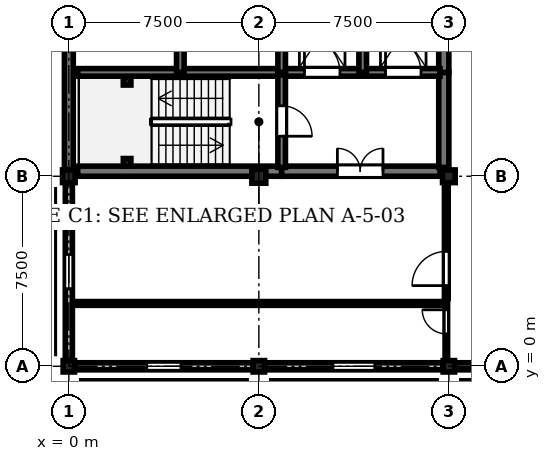
"""IFC4 building model, lengths in metres.
Left out: names, types, materials, properties, quantities, classifications, styles, units other than length and angle.
Written with IfcOpenShell. Run it as: python <this file> out.ifc"""

import sys

from ifc_helpers import new_model, si_unit, direction, frame, frame_2d, origin, origin_with_axes, origin_2d, place, context, subcontext, project, spatial, rectangle, i_section, extrude, element, fill, save


model = new_model("IFC4")
c1 = context("Model", 3, precision=1e-05, world=origin(), true_north=direction((0.0, 1.0)))
c2 = subcontext(c1, "Body", "Model", "MODEL_VIEW")
j1 = project(units=[si_unit("LENGTHUNIT", "METRE"), si_unit("PLANEANGLEUNIT", "RADIAN")], contexts=[c1])
p1 = place(None, origin())
s1 = spatial("IfcSite", under=j1, at=p1, CompositionType="ELEMENT")
p2 = place(p1, origin())
s2 = spatial("IfcBuilding", under=s1, at=p2, CompositionType="ELEMENT")
p3 = place(p2, frame((0.0, 0.0, 25.95)))
s3 = spatial("IfcBuildingStorey", under=s2, at=p3, CompositionType="ELEMENT", Elevation=25.95)
p4 = place(p3, origin_with_axes())
e1 = element("IfcColumn", 1, at=p4, inside=s3, PredefinedType="COLUMN", context=c2, shape_type="SweptSolid", body=[
    extrude(rectangle(XDim=0.45, YDim=0.45, at=origin_2d()), origin(), (0.0, 0.0, 1.0), 4.05),
])
p5 = place(p3, frame((0.0, 7.5, 0.0), z_axis=(0.0, 0.0, 1.0), x_axis=(1.0, 0.0, 0.0)))
e2 = element("IfcColumn", 2, at=p5, inside=s3, PredefinedType="COLUMN", context=c2, shape_type="SweptSolid", body=[
    extrude(rectangle(XDim=0.5, YDim=0.5, at=origin_2d()), origin(), (0.0, 0.0, 1.0), 4.05),
])
p6 = place(p3, frame((7.5, 0.0, 0.0), z_axis=(0.0, 0.0, 1.0), x_axis=(1.0, 0.0, 0.0)))
e3 = element("IfcColumn", 3, at=p6, inside=s3, PredefinedType="COLUMN", context=c2, shape_type="SweptSolid", body=[
    extrude(rectangle(XDim=0.45, YDim=0.45, at=origin_2d()), origin(), (0.0, 0.0, 1.0), 4.05),
])
p7 = place(p3, frame((7.5, 7.5, 0.0), z_axis=(0.0, 0.0, 1.0), x_axis=(1.0, 0.0, 0.0)))
e4 = element("IfcColumn", 4, at=p7, inside=s3, PredefinedType="COLUMN", context=c2, shape_type="SweptSolid", body=[
    extrude(rectangle(XDim=0.55, YDim=0.55, at=origin_2d()), origin(), (0.0, 0.0, 1.0), 4.05),
])
p8 = place(p3, frame((15.0, 0.0, 0.0), z_axis=(0.0, 0.0, 1.0), x_axis=(1.0, 0.0, 0.0)))
e5 = element("IfcColumn", 5, at=p8, inside=s3, PredefinedType="COLUMN", context=c2, shape_type="SweptSolid", body=[
    extrude(rectangle(XDim=0.45, YDim=0.45, at=origin_2d()), origin(), (0.0, 0.0, 1.0), 4.05),
])
p9 = place(p3, frame((15.0, 7.5, 0.0), z_axis=(0.0, 0.0, 1.0), x_axis=(1.0, 0.0, 0.0)))
e6 = element("IfcColumn", 6, at=p9, inside=s3, PredefinedType="COLUMN", context=c2, shape_type="SweptSolid", body=[
    extrude(rectangle(XDim=0.5, YDim=0.5, at=origin_2d()), origin(), (0.0, 0.0, 1.0), 4.05),
])
for number, where, z_axis, x_axis in (
    (7, (2.3, 8.05, 0.0), (0.0, 0.0, 1.0), (1.0, 0.0, 0.0)),
    (8, (2.3, 11.25, 0.0), (0.0, 0.0, 1.0), (1.0, 0.0, 0.0)),
):
    element("IfcColumn", number, at=place(p3, frame(where, z_axis=z_axis, x_axis=x_axis)), inside=s3, PredefinedType="COLUMN", context=c2, shape_type="SweptSolid", body=[
        extrude(i_section(OverallWidth=0.3, OverallDepth=0.3, WebThickness=0.011, FlangeThickness=0.019, FilletRadius=0.027, at=origin_2d()), origin(), (0.0, 0.0, 1.0), 4.05),
    ])
p10 = place(p3, frame((7.265, 0.0, 0.0), z_axis=(0.0, 0.0, 1.0), x_axis=(-1.0, 0.0, 0.0)))
e9 = element("IfcWall", 9, at=p10, inside=s3, PredefinedType="STANDARD", context=c2, shape_type="SweptSolid", body=[
    extrude(rectangle(XDim=7.03, YDim=0.28, at=frame_2d((3.515, 0.0))), origin(), (0.0, 0.0, 1.0), 3.17),
])
p11 = place(p10, frame((2.84, 0.0, 0.85)))
e10 = element("IfcOpeningElement", 10, at=p11, cuts=e9, PredefinedType="OPENING", context=c2, shape_type="SweptSolid", body=[
    extrude(rectangle(XDim=1.35, YDim=2.04, at=frame_2d((0.675, 1.02))), frame((0.0, 0.15, 0.0), z_axis=(0.0, -1.0, 0.0), x_axis=(1.0, 0.0, 0.0)), (0.0, 0.0, 1.0), 0.3),
])
p12 = place(p3, frame((0.0, 0.235, 0.0), z_axis=(0.0, 0.0, 1.0), x_axis=(0.0, 1.0, 0.0)))
e11 = element("IfcWall", 11, at=p12, inside=s3, PredefinedType="STANDARD", context=c2, shape_type="SweptSolid", body=[
    extrude(rectangle(XDim=7.005, YDim=0.28, at=frame_2d((3.502, 0.0))), origin(), (0.0, 0.0, 1.0), 3.17),
])
p13 = place(p12, frame((2.827, 0.0, 0.85)))
e12 = element("IfcOpeningElement", 12, at=p13, cuts=e11, PredefinedType="OPENING", context=c2, shape_type="SweptSolid", body=[
    extrude(rectangle(XDim=1.35, YDim=2.04, at=frame_2d((0.675, 1.02))), frame((0.0, 0.15, 0.0), z_axis=(0.0, -1.0, 0.0), x_axis=(1.0, 0.0, 0.0)), (0.0, 0.0, 1.0), 0.3),
])
p14 = place(p3, frame((0.0, 7.76, 0.0), z_axis=(0.0, 0.0, 1.0), x_axis=(0.0, 1.0, 0.0)))
e13 = element("IfcWall", 13, at=p14, inside=s3, PredefinedType="SHEAR", context=c2, shape_type="SweptSolid", body=[
    extrude(rectangle(XDim=6.955, YDim=0.35, at=frame_2d((3.478, 0.0))), origin(), (0.0, 0.0, 1.0), 3.77),
])
p15 = place(p3, frame((14.765, 0.0, 0.0), z_axis=(0.0, 0.0, 1.0), x_axis=(-1.0, 0.0, 0.0)))
e14 = element("IfcWall", 14, at=p15, inside=s3, PredefinedType="STANDARD", context=c2, shape_type="SweptSolid", body=[
    extrude(rectangle(XDim=7.03, YDim=0.28, at=frame_2d((3.515, 0.0))), origin(), (0.0, 0.0, 1.0), 3.17),
])
p16 = place(p15, frame((2.69, 0.0, 0.85)))
e15 = element("IfcOpeningElement", 15, at=p16, cuts=e14, PredefinedType="OPENING", context=c2, shape_type="SweptSolid", body=[
    extrude(rectangle(XDim=1.65, YDim=2.04, at=frame_2d((0.825, 1.02))), frame((0.0, 0.15, 0.0), z_axis=(0.0, -1.0, 0.0), x_axis=(1.0, 0.0, 0.0)), (0.0, 0.0, 1.0), 0.3),
])
p17 = place(p3, frame((22.265, 0.0, 0.0), z_axis=(0.0, 0.0, 1.0), x_axis=(-1.0, 0.0, 0.0)))
e16 = element("IfcWall", 16, at=p17, inside=s3, PredefinedType="STANDARD", context=c2, shape_type="SweptSolid", body=[
    extrude(rectangle(XDim=7.03, YDim=0.28, at=frame_2d((3.515, 0.0))), origin(), (0.0, 0.0, 1.0), 3.17),
])
p18 = place(p17, frame((2.84, 0.0, 0.85)))
e17 = element("IfcOpeningElement", 17, at=p18, cuts=e16, PredefinedType="OPENING", context=c2, shape_type="SweptSolid", body=[
    extrude(rectangle(XDim=1.35, YDim=2.04, at=frame_2d((0.675, 1.02))), frame((0.0, 0.15, 0.0), z_axis=(0.0, -1.0, 0.0), x_axis=(1.0, 0.0, 0.0)), (0.0, 0.0, 1.0), 0.3),
])
p19 = place(p3, frame((0.35, 7.7, 0.0), z_axis=(0.0, 0.0, 1.0), x_axis=(1.0, 0.0, 0.0)))
e18 = element("IfcWall", 18, at=p19, inside=s3, PredefinedType="SHEAR", context=c2, shape_type="SweptSolid", body=[
    extrude(rectangle(XDim=8.05, YDim=0.4, at=frame_2d((4.025, 0.0))), origin(), (0.0, 0.0, 1.0), 3.77),
])
p20 = place(p3, frame((8.4, 7.7, 0.0), z_axis=(0.0, 0.0, 1.0), x_axis=(1.0, 0.0, 0.0)))
e19 = element("IfcWall", 19, at=p20, inside=s3, PredefinedType="SHEAR", context=c2, shape_type="SweptSolid", body=[
    extrude(rectangle(XDim=6.25, YDim=0.4, at=frame_2d((3.125, 0.0))), origin(), (0.0, 0.0, 1.0), 3.77),
])
p21 = place(p20, frame((2.2, 0.0, 0.0)))
e20 = element("IfcOpeningElement", 20, at=p21, cuts=e19, PredefinedType="OPENING", context=c2, shape_type="SweptSolid", body=[
    extrude(rectangle(XDim=1.8, YDim=2.25, at=frame_2d((0.9, 1.125))), frame((0.0, 0.21, 0.0), z_axis=(0.0, -1.0, 0.0), x_axis=(1.0, 0.0, 0.0)), (0.0, 0.0, 1.0), 0.42),
])
p22 = place(p3, frame((14.8, 7.85, 0.0), z_axis=(0.0, 0.0, 1.0), x_axis=(0.0, 1.0, 0.0)))
e21 = element("IfcWall", 21, at=p22, inside=s3, PredefinedType="SHEAR", context=c2, shape_type="SweptSolid", body=[
    extrude(rectangle(XDim=3.75, YDim=0.4, at=frame_2d((1.875, 0.0))), origin(), (0.0, 0.0, 1.0), 3.77),
])
p23 = place(p3, frame((14.8, 11.6, 0.0), z_axis=(0.0, 0.0, 1.0), x_axis=(0.0, 1.0, 0.0)))
e22 = element("IfcWall", 22, at=p23, inside=s3, PredefinedType="SHEAR", context=c2, shape_type="SweptSolid", body=[
    extrude(rectangle(XDim=3.05, YDim=0.4, at=frame_2d((1.525, 0.0))), origin(), (0.0, 0.0, 1.0), 3.77),
])
p24 = place(p3, frame((0.35, 11.6, 0.0), z_axis=(0.0, 0.0, 1.0), x_axis=(1.0, 0.0, 0.0)))
e23 = element("IfcWall", 23, at=p24, inside=s3, PredefinedType="SHEAR", context=c2, shape_type="SweptSolid", body=[
    extrude(rectangle(XDim=8.05, YDim=0.3, at=frame_2d((4.025, 0.0))), origin(), (0.0, 0.0, 1.0), 3.77),
])
p25 = place(p3, frame((8.4, 11.6, 0.0), z_axis=(0.0, 0.0, 1.0), x_axis=(1.0, 0.0, 0.0)))
e24 = element("IfcWall", 24, at=p25, inside=s3, PredefinedType="SHEAR", context=c2, shape_type="SweptSolid", body=[
    extrude(rectangle(XDim=6.25, YDim=0.3, at=frame_2d((3.125, 0.0))), origin(), (0.0, 0.0, 1.0), 3.77),
])
p26 = place(p25, frame((0.9, 0.0, 0.0)))
e25 = element("IfcOpeningElement", 25, at=p26, cuts=e24, PredefinedType="OPENING", context=c2, shape_type="SweptSolid", body=[
    extrude(rectangle(XDim=1.4, YDim=2.25, at=frame_2d((0.7, 1.125))), frame((0.0, 0.16, 0.0), z_axis=(0.0, -1.0, 0.0), x_axis=(1.0, 0.0, 0.0)), (0.0, 0.0, 1.0), 0.32),
])
p27 = place(p25, frame((4.1, 0.0, 0.0)))
e26 = element("IfcOpeningElement", 26, at=p27, cuts=e24, PredefinedType="OPENING", context=c2, shape_type="SweptSolid", body=[
    extrude(rectangle(XDim=1.4, YDim=2.25, at=frame_2d((0.7, 1.125))), frame((0.0, 0.16, 0.0), z_axis=(0.0, -1.0, 0.0), x_axis=(1.0, 0.0, 0.0)), (0.0, 0.0, 1.0), 0.32),
])
p28 = place(p3, frame((8.4, 11.5, 0.0), z_axis=(0.0, 0.0, 1.0), x_axis=(0.0, -1.0, 0.0)))
e27 = element("IfcWall", 27, at=p28, inside=s3, PredefinedType="SHEAR", context=c2, shape_type="SweptSolid", body=[
    extrude(rectangle(XDim=3.65, YDim=0.3, at=frame_2d((1.825, 0.0))), origin(), (0.0, 0.0, 1.0), 3.77),
])
p29 = place(p28, frame((1.22, 0.0, 0.0)))
e28 = element("IfcOpeningElement", 28, at=p29, cuts=e27, PredefinedType="OPENING", context=c2, shape_type="SweptSolid", body=[
    extrude(rectangle(XDim=1.2, YDim=2.25, at=frame_2d((0.6, 1.125))), frame((0.0, 0.16, 0.0), z_axis=(0.0, -1.0, 0.0), x_axis=(1.0, 0.0, 0.0)), (0.0, 0.0, 1.0), 0.32),
])
for number, where, z_axis, x_axis in (
    (29, (4.4, 11.6, 0.0), (0.0, 0.0, 1.0), (0.0, 1.0, 0.0)),
    (30, (8.4, 11.6, 0.0), (0.0, 0.0, 1.0), (0.0, 1.0, 0.0)),
    (31, (11.6, 11.6, 0.0), (0.0, 0.0, 1.0), (0.0, 1.0, 0.0)),
):
    element("IfcWall", number, at=place(p3, frame(where, z_axis=z_axis, x_axis=x_axis)), inside=s3, PredefinedType="SHEAR", context=c2, shape_type="SweptSolid", body=[
        extrude(rectangle(XDim=3.15, YDim=0.3, at=frame_2d((1.575, 0.0))), origin(), (0.0, 0.0, 1.0), 3.77),
    ])
p30 = place(p3, frame((14.9, 0.43, 0.0), z_axis=(0.0, 0.0, 1.0), x_axis=(0.0, 1.0, 0.0)))
e32 = element("IfcWall", 32, at=p30, inside=s3, PredefinedType="PARTITIONING", context=c2, shape_type="SweptSolid", body=[
    extrude(rectangle(XDim=2.05, YDim=0.1, at=frame_2d((1.025, 0.0))), origin(), (0.0, 0.0, 1.0), 3.205),
])
p31 = place(p30, frame((0.85, 0.0, 0.0)))
e33 = element("IfcOpeningElement", 33, at=p31, cuts=e32, PredefinedType="OPENING", context=c2, shape_type="SweptSolid", body=[
    extrude(rectangle(XDim=0.95, YDim=2.15, at=frame_2d((0.475, 1.075))), frame((0.0, 0.06, 0.0), z_axis=(0.0, -1.0, 0.0), x_axis=(1.0, 0.0, 0.0)), (0.0, 0.0, 1.0), 0.12),
])
p32 = place(p3, frame((14.9, 2.68, 0.0), z_axis=(0.0, 0.0, 1.0), x_axis=(0.0, 1.0, 0.0)))
e34 = element("IfcWall", 34, at=p32, inside=s3, PredefinedType="PARTITIONING", context=c2, shape_type="SweptSolid", body=[
    extrude(rectangle(XDim=4.39, YDim=0.15, at=frame_2d((2.195, 0.0))), origin(), (0.0, 0.0, 1.0), 3.205),
])
p33 = place(p32, frame((0.504, 0.0, 0.0)))
e35 = element("IfcOpeningElement", 35, at=p33, cuts=e34, PredefinedType="OPENING", context=c2, shape_type="SweptSolid", body=[
    extrude(rectangle(XDim=1.35, YDim=2.25, at=frame_2d((0.675, 1.125))), frame((0.0, 0.085, 0.0), z_axis=(0.0, -1.0, 0.0), x_axis=(1.0, 0.0, 0.0)), (0.0, 0.0, 1.0), 0.17),
])
p34 = place(p3, frame((0.35, 2.48, 0.0), z_axis=(0.0, 0.0, 1.0), x_axis=(1.0, 0.0, 0.0)))
e36 = element("IfcWall", 36, at=p34, inside=s3, PredefinedType="PARTITIONING", context=c2, shape_type="SweptSolid", body=[
    extrude(rectangle(XDim=14.55, YDim=0.15, at=frame_2d((7.275, 0.0))), origin(), (0.0, 0.0, 1.0), 3.755),
])
p35 = place(p11, origin())
e37 = element("IfcWindow", 37, at=p35, inside=s3, PartitioningType="SINGLE_PANEL", PredefinedType="WINDOW", context=c2, shape_type="SweptSolid", body=[
    extrude(rectangle(XDim=1.35, YDim=2.04, at=frame_2d((0.675, 1.02))), frame((0.0, 0.03, 0.0), z_axis=(0.0, -1.0, 0.0), x_axis=(1.0, 0.0, 0.0)), (0.0, 0.0, 1.0), 0.06),
])
fill(e10, e37)
p36 = place(p13, origin())
e38 = element("IfcWindow", 38, at=p36, inside=s3, PartitioningType="SINGLE_PANEL", PredefinedType="WINDOW", context=c2, shape_type="SweptSolid", body=[
    extrude(rectangle(XDim=1.35, YDim=2.04, at=frame_2d((0.675, 1.02))), frame((0.0, 0.03, 0.0), z_axis=(0.0, -1.0, 0.0), x_axis=(1.0, 0.0, 0.0)), (0.0, 0.0, 1.0), 0.06),
])
fill(e12, e38)
p37 = place(p16, origin())
e39 = element("IfcWindow", 39, at=p37, inside=s3, PartitioningType="SINGLE_PANEL", PredefinedType="WINDOW", context=c2, shape_type="SweptSolid", body=[
    extrude(rectangle(XDim=1.65, YDim=2.04, at=frame_2d((0.825, 1.02))), frame((0.0, 0.03, 0.0), z_axis=(0.0, -1.0, 0.0), x_axis=(1.0, 0.0, 0.0)), (0.0, 0.0, 1.0), 0.06),
])
fill(e15, e39)
p38 = place(p21, origin())
e40 = element("IfcDoor", 40, at=p38, inside=s3, OperationType="DOUBLE_DOOR_SINGLE_SWING", PredefinedType="DOOR", context=c2, shape_type="SweptSolid", body=[
    extrude(rectangle(XDim=1.8, YDim=2.25, at=frame_2d((0.9, 1.125))), frame((0.0, 0.025, 0.0), z_axis=(0.0, -1.0, 0.0), x_axis=(1.0, 0.0, 0.0)), (0.0, 0.0, 1.0), 0.05),
])
fill(e20, e40)
p39 = place(p26, origin())
e41 = element("IfcDoor", 41, at=p39, inside=s3, OperationType="DOUBLE_DOOR_SLIDING", PredefinedType="DOOR", context=c2, shape_type="SweptSolid", body=[
    extrude(rectangle(XDim=1.4, YDim=2.25, at=frame_2d((0.7, 1.125))), frame((0.0, 0.025, 0.0), z_axis=(0.0, -1.0, 0.0), x_axis=(1.0, 0.0, 0.0)), (0.0, 0.0, 1.0), 0.05),
])
fill(e25, e41)
p40 = place(p27, origin())
e42 = element("IfcDoor", 42, at=p40, inside=s3, OperationType="DOUBLE_DOOR_SLIDING", PredefinedType="DOOR", context=c2, shape_type="SweptSolid", body=[
    extrude(rectangle(XDim=1.4, YDim=2.25, at=frame_2d((0.7, 1.125))), frame((0.0, 0.025, 0.0), z_axis=(0.0, -1.0, 0.0), x_axis=(1.0, 0.0, 0.0)), (0.0, 0.0, 1.0), 0.05),
])
fill(e26, e42)
p41 = place(p29, origin())
e43 = element("IfcDoor", 43, at=p41, inside=s3, OperationType="SINGLE_SWING_RIGHT", PredefinedType="DOOR", context=c2, shape_type="SweptSolid", body=[
    extrude(rectangle(XDim=1.2, YDim=2.25, at=frame_2d((0.6, 1.125))), frame((0.0, 0.025, 0.0), z_axis=(0.0, -1.0, 0.0), x_axis=(1.0, 0.0, 0.0)), (0.0, 0.0, 1.0), 0.05),
])
fill(e28, e43)
p42 = place(p31, origin())
e44 = element("IfcDoor", 44, at=p42, inside=s3, OperationType="SINGLE_SWING_RIGHT", PredefinedType="DOOR", context=c2, shape_type="SweptSolid", body=[
    extrude(rectangle(XDim=0.95, YDim=2.15, at=frame_2d((0.475, 1.075))), frame((0.0, 0.025, 0.0), z_axis=(0.0, -1.0, 0.0), x_axis=(1.0, 0.0, 0.0)), (0.0, 0.0, 1.0), 0.05),
])
fill(e33, e44)
p43 = place(p33, origin())
e45 = element("IfcDoor", 45, at=p43, inside=s3, OperationType="SINGLE_SWING_LEFT", PredefinedType="DOOR", context=c2, shape_type="SweptSolid", body=[
    extrude(rectangle(XDim=1.35, YDim=2.25, at=frame_2d((0.675, 1.125))), frame((0.0, 0.025, 0.0), z_axis=(0.0, -1.0, 0.0), x_axis=(1.0, 0.0, 0.0)), (0.0, 0.0, 1.0), 0.05),
])
fill(e35, e45)
save(model, sys.argv[1])
